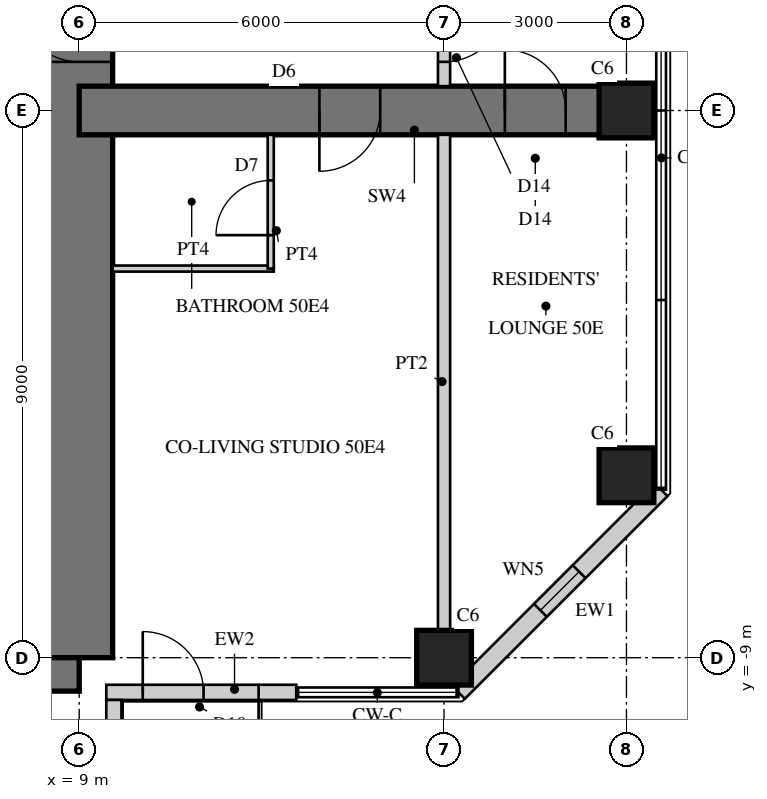
"""IFC4 building model, lengths in metres.
Left out: names, types, materials, properties, quantities, classifications, styles, units other than length and angle.
Written with IfcOpenShell. Run it as: python <this file> out.ifc"""

import sys

from ifc_helpers import new_model, si_unit, direction, frame, frame_2d, origin, origin_2d, place, context, subcontext, project, spatial, rectangle, hollow_rectangle, extrude, element, fill, save


model = new_model("IFC4")
c1 = context("Model", 3, precision=1e-05, world=origin(), true_north=direction((0.0, 1.0)))
c2 = subcontext(c1, "Body", "Model", "MODEL_VIEW")
j1 = project(units=[si_unit("LENGTHUNIT", "METRE"), si_unit("PLANEANGLEUNIT", "RADIAN")], contexts=[c1])
p1 = place(None, origin())
s1 = spatial("IfcSite", under=j1, at=p1, CompositionType="ELEMENT")
p2 = place(p1, origin())
s2 = spatial("IfcBuilding", under=s1, at=p2, CompositionType="ELEMENT")
p3 = place(p2, frame((0.0, 0.0, 200.1)))
s3 = spatial("IfcBuildingStorey", under=s2, at=p3, CompositionType="ELEMENT", Elevation=200.1)
p4 = place(p3, frame((-9.0, -9.0, 0.0), z_axis=(0.0, 0.0, 1.0), x_axis=(1.0, 0.0, 0.0)))
e1 = element("IfcWall", 1, at=p4, inside=s3, PredefinedType="SHEAR", context=c2, shape_type="SweptSolid", body=[
    extrude(rectangle(XDim=18.0, YDim=1.1, at=frame_2d((9.0, 0.0))), origin(), (0.0, 0.0, 1.0), 3.4),
])
p5 = place(p4, frame((9.8, 0.0, 0.0)))
e2 = element("IfcOpeningElement", 2, at=p5, cuts=e1, PredefinedType="OPENING", context=c2, shape_type="SweptSolid", body=[
    extrude(rectangle(XDim=1.0, YDim=2.4, at=frame_2d((0.5, 1.2))), frame((0.0, 0.56, 0.0), z_axis=(0.0, -1.0, 0.0), x_axis=(1.0, 0.0, 0.0)), (0.0, 0.0, 1.0), 1.12),
])
p6 = place(p3, frame((9.0, -9.0, 0.0), z_axis=(0.0, 0.0, 1.0), x_axis=(0.0, 1.0, 0.0)))
e3 = element("IfcWall", 3, at=p6, inside=s3, PredefinedType="SHEAR", context=c2, shape_type="SweptSolid", body=[
    extrude(rectangle(XDim=18.0, YDim=1.1, at=frame_2d((9.0, 0.0))), origin(), (0.0, 0.0, 1.0), 3.4),
])
p7 = place(p6, frame((9.8, 0.0, 0.0)))
e4 = element("IfcOpeningElement", 4, at=p7, cuts=e3, PredefinedType="OPENING", context=c2, shape_type="SweptSolid", body=[
    extrude(rectangle(XDim=1.0, YDim=2.4, at=frame_2d((0.5, 1.2))), frame((0.0, 0.56, 0.0), z_axis=(0.0, -1.0, 0.0), x_axis=(1.0, 0.0, 0.0)), (0.0, 0.0, 1.0), 1.12),
])
p8 = place(p3, frame((9.0, 0.0, 0.0), z_axis=(0.0, 0.0, 1.0), x_axis=(1.0, 0.0, 0.0)))
e5 = element("IfcWall", 5, at=p8, inside=s3, PredefinedType="SHEAR", context=c2, shape_type="SweptSolid", body=[
    extrude(rectangle(XDim=9.0, YDim=0.8, at=frame_2d((4.5, 0.0))), origin(), (0.0, 0.0, 1.0), 3.4),
])
p9 = place(p8, frame((3.95, 0.0, 0.0)))
e6 = element("IfcOpeningElement", 6, at=p9, cuts=e5, PredefinedType="OPENING", context=c2, shape_type="SweptSolid", body=[
    extrude(rectangle(XDim=1.0, YDim=2.15, at=frame_2d((0.5, 1.075))), frame((0.0, 0.41, 0.0), z_axis=(0.0, -1.0, 0.0), x_axis=(1.0, 0.0, 0.0)), (0.0, 0.0, 1.0), 0.82),
])
p10 = place(p8, frame((7.0, 0.0, 0.0)))
e7 = element("IfcOpeningElement", 7, at=p10, cuts=e5, PredefinedType="OPENING", context=c2, shape_type="SweptSolid", body=[
    extrude(rectangle(XDim=1.0, YDim=2.2, at=frame_2d((0.5, 1.1))), frame((0.0, 0.41, 0.0), z_axis=(0.0, -1.0, 0.0), x_axis=(1.0, 0.0, 0.0)), (0.0, 0.0, 1.0), 0.82),
])
for number, where, z_axis, x_axis in (
    (8, (15.0, -9.0, 0.0), (0.0, 0.0, 1.0), (1.0, 0.0, 0.0)),
    (9, (18.0, -6.0, 0.0), (0.0, 0.0, 1.0), (1.0, 0.0, 0.0)),
    (10, (18.0, 0.0, 0.0), (0.0, 0.0, 1.0), (1.0, 0.0, 0.0)),
):
    element("IfcColumn", number, at=place(p3, frame(where, z_axis=z_axis, x_axis=x_axis)), inside=s3, PredefinedType="COLUMN", context=c2, shape_type="SweptSolid", body=[
        extrude(rectangle(XDim=0.9, YDim=0.9, at=origin_2d()), origin(), (0.0, 0.0, 1.0), 3.4),
    ])
p11 = place(p3, frame((9.445, -9.57, 0.0), z_axis=(0.0, 0.0, 1.0), x_axis=(1.0, 0.0, 0.0)))
e11 = element("IfcWall", 11, at=p11, inside=s3, PredefinedType="SOLIDWALL", context=c2, shape_type="SweptSolid", body=[
    extrude(rectangle(XDim=3.125, YDim=0.25, at=frame_2d((1.562, 0.0))), origin(), (0.0, 0.0, 1.0), 3.22),
])
p12 = place(p11, frame((0.6, 0.0, 0.0)))
e12 = element("IfcOpeningElement", 12, at=p12, cuts=e11, PredefinedType="OPENING", context=c2, shape_type="SweptSolid", body=[
    extrude(rectangle(XDim=1.0, YDim=2.2, at=frame_2d((0.5, 1.1))), frame((0.0, 0.135, 0.0), z_axis=(0.0, -1.0, 0.0), x_axis=(1.0, 0.0, 0.0)), (0.0, 0.0, 1.0), 0.27),
])
p13 = place(p3, frame((15.236, -9.57, 0.0), z_axis=(0.0, 0.0, 1.0), x_axis=(0.707106781187, 0.707106781187, 0.0)))
e13 = element("IfcWall", 13, at=p13, inside=s3, PredefinedType="SOLIDWALL", context=c2, shape_type="SweptSolid", body=[
    extrude(rectangle(XDim=4.715, YDim=0.3, at=frame_2d((2.357, 0.0))), origin(), (0.0, 0.0, 1.0), 3.22),
])
p14 = place(p13, frame((1.907, 0.0, 0.3)))
e14 = element("IfcOpeningElement", 14, at=p14, cuts=e13, PredefinedType="OPENING", context=c2, shape_type="SweptSolid", body=[
    extrude(rectangle(XDim=0.9, YDim=2.4, at=frame_2d((0.45, 1.2))), frame((0.0, 0.16, 0.0), z_axis=(0.0, -1.0, 0.0), x_axis=(1.0, 0.0, 0.0)), (0.0, 0.0, 1.0), 0.32),
])
p15 = place(p3, frame((9.57, -12.57, 0.0), z_axis=(0.0, 0.0, 1.0), x_axis=(0.0, 1.0, 0.0)))
e15 = element("IfcWall", 15, at=p15, inside=s3, PredefinedType="SOLIDWALL", context=c2, shape_type="SweptSolid", body=[
    extrude(rectangle(XDim=2.875, YDim=0.25, at=frame_2d((1.438, 0.0))), origin(), (0.0, 0.0, 1.0), 3.22),
])
p16 = place(p15, frame((0.6, 0.0, 0.0)))
e16 = element("IfcOpeningElement", 16, at=p16, cuts=e15, PredefinedType="OPENING", context=c2, shape_type="SweptSolid", body=[
    extrude(rectangle(XDim=1.0, YDim=2.2, at=frame_2d((0.5, 1.1))), frame((0.0, 0.135, 0.0), z_axis=(0.0, -1.0, 0.0), x_axis=(1.0, 0.0, 0.0)), (0.0, 0.0, 1.0), 0.27),
])
p17 = place(p3, frame((9.55, -2.6, 0.0), z_axis=(0.0, 0.0, 1.0), x_axis=(1.0, 0.0, 0.0)))
e17 = element("IfcWall", 17, at=p17, inside=s3, PredefinedType="PARTITIONING", context=c2, shape_type="SweptSolid", body=[
    extrude(rectangle(XDim=2.65, YDim=0.1, at=frame_2d((1.325, 0.0))), origin(), (0.0, 0.0, 1.0), 3.22),
])
p18 = place(p3, frame((12.15, -2.6, 0.0), z_axis=(0.0, 0.0, 1.0), x_axis=(0.0, 1.0, 0.0)))
e18 = element("IfcWall", 18, at=p18, inside=s3, PredefinedType="PARTITIONING", context=c2, shape_type="SweptSolid", body=[
    extrude(rectangle(XDim=2.2, YDim=0.1, at=frame_2d((1.1, 0.0))), origin(), (0.0, 0.0, 1.0), 3.22),
])
p19 = place(p18, frame((0.55, 0.0, 0.0)))
e19 = element("IfcOpeningElement", 19, at=p19, cuts=e18, PredefinedType="OPENING", context=c2, shape_type="SweptSolid", body=[
    extrude(rectangle(XDim=0.9, YDim=2.1, at=frame_2d((0.45, 1.05))), frame((0.0, 0.06, 0.0), z_axis=(0.0, -1.0, 0.0), x_axis=(1.0, 0.0, 0.0)), (0.0, 0.0, 1.0), 0.12),
])
p20 = place(p3, frame((15.0, -8.55, 0.0), z_axis=(0.0, 0.0, 1.0), x_axis=(0.0, 1.0, 0.0)))
e20 = element("IfcWall", 20, at=p20, inside=s3, PredefinedType="SOLIDWALL", context=c2, shape_type="SweptSolid", body=[
    extrude(rectangle(XDim=8.15, YDim=0.2, at=frame_2d((4.075, 0.0))), origin(), (0.0, 0.0, 1.0), 2.47),
])
p21 = place(p3, frame((15.0, 0.4, 0.0), z_axis=(0.0, 0.0, 1.0), x_axis=(0.0, 1.0, 0.0)))
e21 = element("IfcWall", 21, at=p21, inside=s3, PredefinedType="SOLIDWALL", context=c2, shape_type="SweptSolid", body=[
    extrude(rectangle(XDim=8.15, YDim=0.2, at=frame_2d((4.075, 0.0))), origin(), (0.0, 0.0, 1.0), 2.47),
])
p22 = place(p21, frame((0.4, 0.0, 0.0)))
e22 = element("IfcOpeningElement", 22, at=p22, cuts=e21, PredefinedType="OPENING", context=c2, shape_type="SweptSolid", body=[
    extrude(rectangle(XDim=1.0, YDim=2.2, at=frame_2d((0.5, 1.1))), frame((0.0, 0.11, 0.0), z_axis=(0.0, -1.0, 0.0), x_axis=(1.0, 0.0, 0.0)), (0.0, 0.0, 1.0), 0.22),
])
p23 = place(p12, origin())
e23 = element("IfcDoor", 23, at=p23, inside=s3, OperationType="SINGLE_SWING_LEFT", PredefinedType="DOOR", context=c2, shape_type="SweptSolid", body=[
    extrude(hollow_rectangle(XDim=1.0, YDim=2.2, WallThickness=0.06, at=frame_2d((0.5, 1.1))), frame((0.0, 0.025, 0.0), z_axis=(0.0, -1.0, 0.0), x_axis=(1.0, 0.0, 0.0)), (0.0, 0.0, 1.0), 0.05),
    extrude(rectangle(XDim=0.879, YDim=2.079, at=frame_2d((0.5, 1.1))), frame((0.0, 0.025, 0.0), z_axis=(0.0, -1.0, 0.0), x_axis=(1.0, 0.0, 0.0)), (0.0, 0.0, 1.0), 0.05),
])
fill(e12, e23)
p24 = place(p14, origin())
e24 = element("IfcWindow", 24, at=p24, inside=s3, PartitioningType="SINGLE_PANEL", PredefinedType="WINDOW", context=c2, shape_type="SweptSolid", body=[
    extrude(hollow_rectangle(XDim=0.9, YDim=2.4, WallThickness=0.06, at=frame_2d((0.45, 1.2))), frame((0.0, 0.03, 0.0), z_axis=(0.0, -1.0, 0.0), x_axis=(1.0, 0.0, 0.0)), (0.0, 0.0, 1.0), 0.06),
    extrude(rectangle(XDim=0.779, YDim=2.279, at=frame_2d((0.45, 1.2))), frame((0.0, 0.03, 0.0), z_axis=(0.0, -1.0, 0.0), x_axis=(1.0, 0.0, 0.0)), (0.0, 0.0, 1.0), 0.06),
])
fill(e14, e24)
p25 = place(p19, origin())
e25 = element("IfcDoor", 25, at=p25, inside=s3, OperationType="SINGLE_SWING_LEFT", PredefinedType="DOOR", context=c2, shape_type="SweptSolid", body=[
    extrude(rectangle(XDim=0.9, YDim=2.1, at=frame_2d((0.45, 1.05))), frame((0.0, 0.025, 0.0), z_axis=(0.0, -1.0, 0.0), x_axis=(1.0, 0.0, 0.0)), (0.0, 0.0, 1.0), 0.05),
])
fill(e19, e25)
p26 = place(p22, frame((1.0, 0.0, 0.0), z_axis=(0.0, 0.0, 1.0), x_axis=(-1.0, 0.0, 0.0)))
e26 = element("IfcDoor", 26, at=p26, inside=s3, OperationType="SINGLE_SWING_LEFT", PredefinedType="DOOR", context=c2, shape_type="SweptSolid", body=[
    extrude(rectangle(XDim=1.0, YDim=2.2, at=frame_2d((0.5, 1.1))), frame((0.0, 0.025, 0.0), z_axis=(0.0, -1.0, 0.0), x_axis=(1.0, 0.0, 0.0)), (0.0, 0.0, 1.0), 0.05),
])
fill(e22, e26)
p27 = place(p9, frame((1.0, 0.0, 0.0), z_axis=(0.0, 0.0, 1.0), x_axis=(-1.0, 0.0, 0.0)))
e27 = element("IfcDoor", 27, at=p27, inside=s3, OperationType="SINGLE_SWING_RIGHT", PredefinedType="DOOR", context=c2, shape_type="SweptSolid", body=[
    extrude(rectangle(XDim=1.0, YDim=2.15, at=frame_2d((0.5, 1.075))), frame((0.0, 0.025, 0.0), z_axis=(0.0, -1.0, 0.0), x_axis=(1.0, 0.0, 0.0)), (0.0, 0.0, 1.0), 0.05),
])
fill(e6, e27)
p28 = place(p10, origin())
e28 = element("IfcDoor", 28, at=p28, inside=s3, OperationType="SINGLE_SWING_LEFT", PredefinedType="DOOR", context=c2, shape_type="SweptSolid", body=[
    extrude(rectangle(XDim=1.0, YDim=2.2, at=frame_2d((0.5, 1.1))), frame((0.0, 0.025, 0.0), z_axis=(0.0, -1.0, 0.0), x_axis=(1.0, 0.0, 0.0)), (0.0, 0.0, 1.0), 0.05),
])
fill(e7, e28)
p29 = place(p7, origin())
e29 = element("IfcDoor", 29, at=p29, inside=s3, OperationType="SINGLE_SWING_RIGHT", PredefinedType="DOOR", context=c2, shape_type="SweptSolid", body=[
    extrude(rectangle(XDim=1.0, YDim=2.4, at=frame_2d((0.5, 1.2))), frame((0.0, 0.055, 0.0), z_axis=(0.0, -1.0, 0.0), x_axis=(1.0, 0.0, 0.0)), (0.0, 0.0, 1.0), 0.05),
])
fill(e4, e29)
save(model, sys.argv[1])
